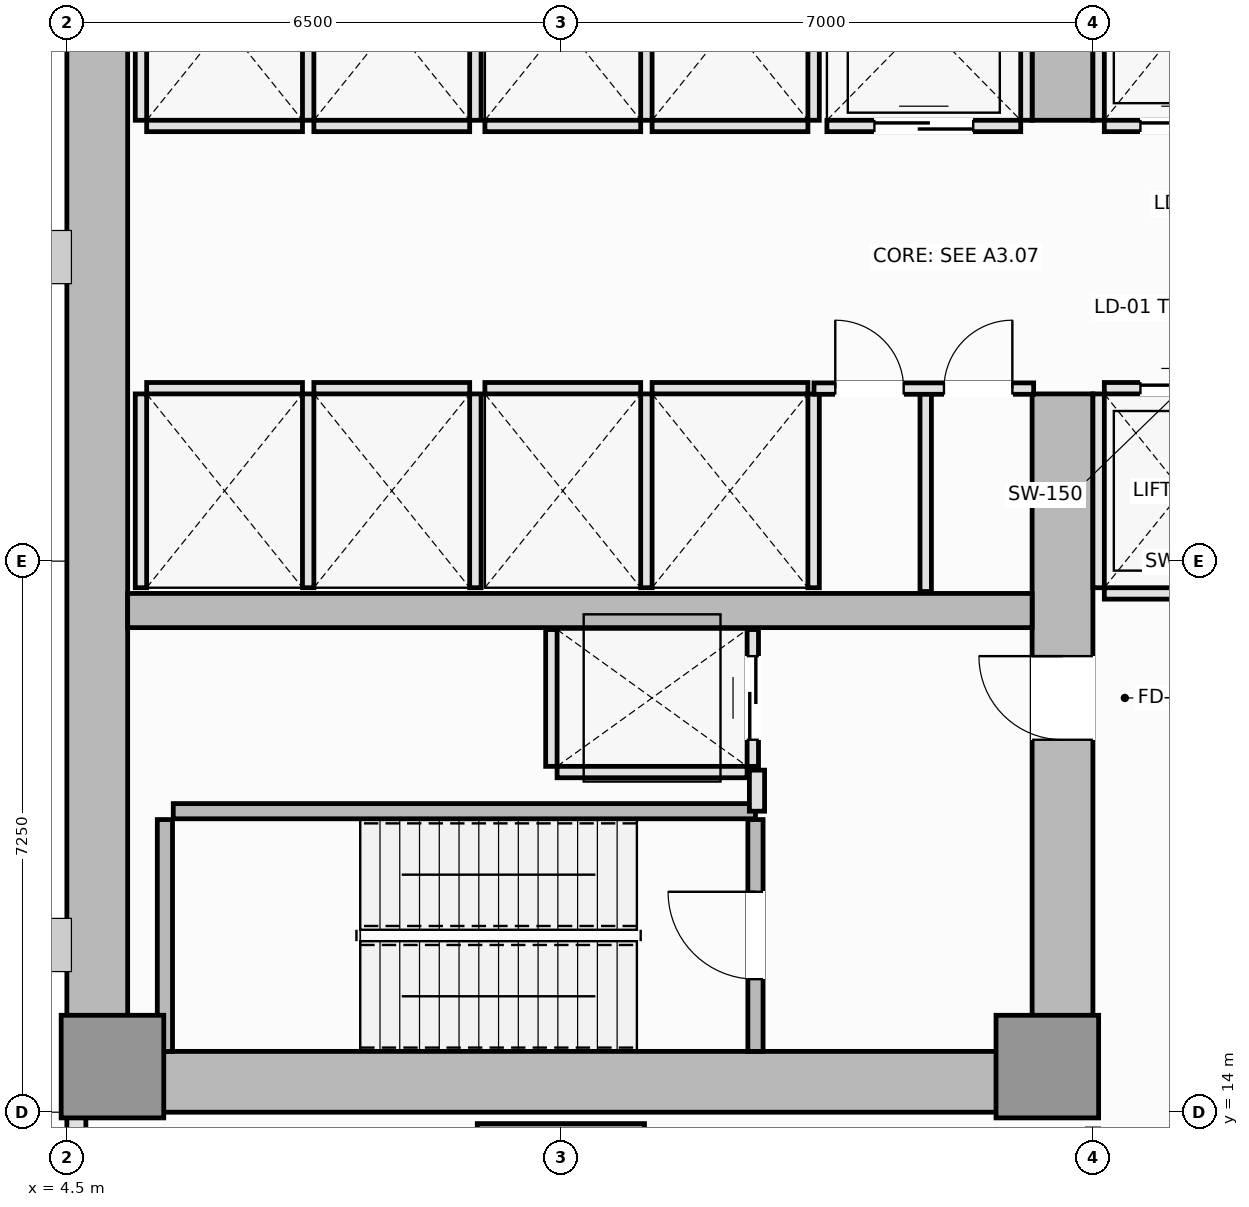
"""IFC4 building model, lengths in metres.
Left out: names, types, materials, properties, quantities, classifications, styles, units other than length and angle.
Written with IfcOpenShell. Run it as: python <this file> out.ifc"""

import sys

from ifc_helpers import new_model, si_unit, direction, frame, frame_2d, origin, origin_2d, place, context, subcontext, project, spatial, rectangle, extrude, element, fill, save


model = new_model("IFC4")
c1 = context("Model", 3, precision=1e-05, world=origin(), true_north=direction((0.0, 1.0)))
c2 = subcontext(c1, "Body", "Model", "MODEL_VIEW")
j1 = project(units=[si_unit("LENGTHUNIT", "METRE"), si_unit("PLANEANGLEUNIT", "RADIAN")], contexts=[c1])
p1 = place(None, origin())
s1 = spatial("IfcSite", under=j1, at=p1, CompositionType="ELEMENT")
p2 = place(p1, origin())
s2 = spatial("IfcBuilding", under=s1, at=p2, CompositionType="ELEMENT")
p3 = place(p2, frame((0.0, 0.0, 93.05)))
s3 = spatial("IfcBuildingStorey", under=s2, at=p3, CompositionType="ELEMENT", Elevation=93.05)
p4 = place(p3, frame((4.5, 14.4, 0.0), z_axis=(0.0, 0.0, 1.0), x_axis=(1.0, 0.0, 0.0)))
e1 = element("IfcWall", 1, at=p4, inside=s3, PredefinedType="SHEAR", context=c2, shape_type="SweptSolid", body=[
    extrude(rectangle(XDim=13.5, YDim=0.8, at=frame_2d((6.75, 0.0))), origin(), (0.0, 0.0, 1.0), 4.8),
])
p5 = place(p3, frame((4.9, 14.8, 0.0), z_axis=(0.0, 0.0, 1.0), x_axis=(0.0, 1.0, 0.0)))
e2 = element("IfcWall", 2, at=p5, inside=s3, PredefinedType="SHEAR", context=c2, shape_type="SweptSolid", body=[
    extrude(rectangle(XDim=20.9, YDim=0.8, at=frame_2d((10.45, 0.0))), origin(), (0.0, 0.0, 1.0), 4.8),
])
p6 = place(p3, frame((17.6, 14.8, 0.0), z_axis=(0.0, 0.0, 1.0), x_axis=(0.0, 1.0, 0.0)))
e3 = element("IfcWall", 3, at=p6, inside=s3, PredefinedType="SHEAR", context=c2, shape_type="SweptSolid", body=[
    extrude(rectangle(XDim=8.65, YDim=0.8, at=frame_2d((4.325, 0.0))), origin(), (0.0, 0.0, 1.0), 4.8),
])
p7 = place(p6, frame((4.1, 0.0, 0.0)))
e4 = element("IfcOpeningElement", 4, at=p7, cuts=e3, PredefinedType="OPENING", context=c2, shape_type="SweptSolid", body=[
    extrude(rectangle(XDim=1.1, YDim=2.15, at=frame_2d((0.55, 1.075))), frame((0.0, 0.41, 0.0), z_axis=(0.0, -1.0, 0.0), x_axis=(1.0, 0.0, 0.0)), (0.0, 0.0, 1.0), 0.82),
])
p8 = place(p3, frame((17.6, 27.05, 0.0), z_axis=(0.0, 0.0, 1.0), x_axis=(0.0, 1.0, 0.0)))
e5 = element("IfcWall", 5, at=p8, inside=s3, PredefinedType="SHEAR", context=c2, shape_type="SweptSolid", body=[
    extrude(rectangle(XDim=8.65, YDim=0.8, at=frame_2d((4.325, 0.0))), origin(), (0.0, 0.0, 1.0), 4.8),
])
p9 = place(p8, frame((3.45, 0.0, 0.0)))
e6 = element("IfcOpeningElement", 6, at=p9, cuts=e5, PredefinedType="OPENING", context=c2, shape_type="SweptSolid", body=[
    extrude(rectangle(XDim=1.1, YDim=2.15, at=frame_2d((0.55, 1.075))), frame((0.0, 0.41, 0.0), z_axis=(0.0, -1.0, 0.0), x_axis=(1.0, 0.0, 0.0)), (0.0, 0.0, 1.0), 0.82),
])
p10 = place(p3, frame((5.3, 20.6, 0.0), z_axis=(0.0, 0.0, 1.0), x_axis=(1.0, 0.0, 0.0)))
e7 = element("IfcWall", 7, at=p10, inside=s3, PredefinedType="SHEAR", context=c2, shape_type="SweptSolid", body=[
    extrude(rectangle(XDim=11.9, YDim=0.45, at=frame_2d((5.95, 0.0))), origin(), (0.0, 0.0, 1.0), 4.8),
])
for number, where, z_axis, x_axis in (
    (8, (5.1, 14.6, 0.0), (0.0, 0.0, 1.0), (1.0, 0.0, 0.0)),
    (9, (17.4, 14.6, 0.0), (0.0, 0.0, 1.0), (1.0, 0.0, 0.0)),
):
    element("IfcColumn", number, at=place(p3, frame(where, z_axis=z_axis, x_axis=x_axis)), inside=s3, PredefinedType="PILASTER", context=c2, shape_type="SweptSolid", body=[
        extrude(rectangle(XDim=1.35, YDim=1.35, at=origin_2d()), origin(), (0.0, 0.0, 1.0), 4.8),
    ])
p11 = place(p3, frame((11.0, 12.75, 0.0), z_axis=(0.0, 0.0, 1.0), x_axis=(1.0, 0.0, 0.0)))
e10 = element("IfcColumn", 10, at=p11, inside=s3, PredefinedType="COLUMN", context=c2, shape_type="SweptSolid", body=[
    extrude(rectangle(XDim=2.2, YDim=2.2, at=origin_2d()), origin(), (0.0, 0.0, 1.0), 4.8),
])
p12 = place(p3, frame((4.625, 14.0, 0.0), z_axis=(0.0, 0.0, 1.0), x_axis=(0.0, -1.0, 0.0)))
e11 = element("IfcWall", 11, at=p12, inside=s3, PredefinedType="SOLIDWALL", context=c2, shape_type="SweptSolid", body=[
    extrude(rectangle(XDim=8.0, YDim=0.25, at=frame_2d((4.0, 0.0))), origin(), (0.0, 0.0, 1.0), 4.62),
])
p13 = place(p3, frame((5.79, 14.8, 0.0), z_axis=(0.0, 0.0, 1.0), x_axis=(0.0, 1.0, 0.0)))
e12 = element("IfcWall", 12, at=p13, inside=s3, PredefinedType="SOLIDWALL", context=c2, shape_type="SweptSolid", body=[
    extrude(rectangle(XDim=3.05, YDim=0.2, at=frame_2d((1.525, 0.0))), origin(), (0.0, 0.0, 1.0), 4.8),
])
p14 = place(p3, frame((5.9, 17.96, 0.0), z_axis=(0.0, 0.0, 1.0), x_axis=(1.0, 0.0, 0.0)))
e13 = element("IfcWall", 13, at=p14, inside=s3, PredefinedType="SOLIDWALL", context=c2, shape_type="SweptSolid", body=[
    extrude(rectangle(XDim=7.66, YDim=0.2, at=frame_2d((3.83, 0.0))), origin(), (0.0, 0.0, 1.0), 4.8),
])
p15 = place(p3, frame((13.56, 14.8, 0.0), z_axis=(0.0, 0.0, 1.0), x_axis=(0.0, 1.0, 0.0)))
e14 = element("IfcWall", 14, at=p15, inside=s3, PredefinedType="SOLIDWALL", context=c2, shape_type="SweptSolid", body=[
    extrude(rectangle(XDim=3.05, YDim=0.2, at=frame_2d((1.525, 0.0))), origin(), (0.0, 0.0, 1.0), 4.8),
])
p16 = place(p15, frame((0.95, 0.0, 0.0)))
e15 = element("IfcOpeningElement", 15, at=p16, cuts=e14, PredefinedType="OPENING", context=c2, shape_type="SweptSolid", body=[
    extrude(rectangle(XDim=1.15, YDim=2.15, at=frame_2d((0.575, 1.075))), frame((0.0, 0.11, 0.0), z_axis=(0.0, -1.0, 0.0), x_axis=(1.0, 0.0, 0.0)), (0.0, 0.0, 1.0), 0.22),
])
p17 = place(p3, frame((18.15, 20.825, 0.0), z_axis=(0.0, 0.0, 1.0), x_axis=(1.0, 0.0, 0.0)))
e16 = element("IfcWall", 16, at=p17, inside=s3, PredefinedType="PARTITIONING", context=c2, shape_type="SweptSolid", body=[
    extrude(rectangle(XDim=2.05, YDim=0.15, at=frame_2d((1.025, 0.0))), origin(), (0.0, 0.0, 1.0), 4.62),
])
p18 = place(p3, frame((18.15, 23.525, 0.0), z_axis=(0.0, 0.0, 1.0), x_axis=(1.0, 0.0, 0.0)))
e17 = element("IfcWall", 17, at=p18, inside=s3, PredefinedType="PARTITIONING", context=c2, shape_type="SweptSolid", body=[
    extrude(rectangle(XDim=2.05, YDim=0.15, at=frame_2d((1.025, 0.0))), origin(), (0.0, 0.0, 1.0), 4.62),
])
p19 = place(p18, frame((0.475, 0.0, 0.0)))
e18 = element("IfcOpeningElement", 18, at=p19, cuts=e17, PredefinedType="OPENING", context=c2, shape_type="SweptSolid", body=[
    extrude(rectangle(XDim=1.1, YDim=2.2, at=frame_2d((0.55, 1.1))), frame((0.0, 0.085, 0.0), z_axis=(0.0, -1.0, 0.0), x_axis=(1.0, 0.0, 0.0)), (0.0, 0.0, 1.0), 0.17),
])
p20 = place(p3, frame((18.075, 20.9, 0.0), z_axis=(0.0, 0.0, 1.0), x_axis=(0.0, 1.0, 0.0)))
e19 = element("IfcWall", 19, at=p20, inside=s3, PredefinedType="PARTITIONING", context=c2, shape_type="SweptSolid", body=[
    extrude(rectangle(XDim=2.55, YDim=0.15, at=frame_2d((1.275, 0.0))), origin(), (0.0, 0.0, 1.0), 4.62),
])
p21 = place(p3, frame((18.15, 26.975, 0.0), z_axis=(0.0, 0.0, 1.0), x_axis=(1.0, 0.0, 0.0)))
e20 = element("IfcWall", 20, at=p21, inside=s3, PredefinedType="PARTITIONING", context=c2, shape_type="SweptSolid", body=[
    extrude(rectangle(XDim=2.05, YDim=0.15, at=frame_2d((1.025, 0.0))), origin(), (0.0, 0.0, 1.0), 4.62),
])
p22 = place(p21, frame((0.475, 0.0, 0.0)))
e21 = element("IfcOpeningElement", 21, at=p22, cuts=e20, PredefinedType="OPENING", context=c2, shape_type="SweptSolid", body=[
    extrude(rectangle(XDim=1.1, YDim=2.2, at=frame_2d((0.55, 1.1))), frame((0.0, 0.085, 0.0), z_axis=(0.0, -1.0, 0.0), x_axis=(1.0, 0.0, 0.0)), (0.0, 0.0, 1.0), 0.17),
])
p23 = place(p3, frame((18.075, 27.05, 0.0), z_axis=(0.0, 0.0, 1.0), x_axis=(0.0, 1.0, 0.0)))
e22 = element("IfcWall", 22, at=p23, inside=s3, PredefinedType="PARTITIONING", context=c2, shape_type="SweptSolid", body=[
    extrude(rectangle(XDim=2.55, YDim=0.15, at=frame_2d((1.275, 0.0))), origin(), (0.0, 0.0, 1.0), 4.62),
])
p24 = place(p3, frame((5.55, 23.525, 0.0), z_axis=(0.0, 0.0, 1.0), x_axis=(1.0, 0.0, 0.0)))
e23 = element("IfcWall", 23, at=p24, inside=s3, PredefinedType="PARTITIONING", context=c2, shape_type="SweptSolid", body=[
    extrude(rectangle(XDim=2.05, YDim=0.15, at=frame_2d((1.025, 0.0))), origin(), (0.0, 0.0, 1.0), 4.62),
])
for number, where, z_axis, x_axis in (
    (24, (5.475, 20.9, 0.0), (0.0, 0.0, 1.0), (0.0, 1.0, 0.0)),
    (25, (7.675, 20.9, 0.0), (0.0, 0.0, 1.0), (0.0, 1.0, 0.0)),
):
    element("IfcWall", number, at=place(p3, frame(where, z_axis=z_axis, x_axis=x_axis)), inside=s3, PredefinedType="PARTITIONING", context=c2, shape_type="SweptSolid", body=[
        extrude(rectangle(XDim=2.55, YDim=0.15, at=frame_2d((1.275, 0.0))), origin(), (0.0, 0.0, 1.0), 4.62),
    ])
p25 = place(p3, frame((7.75, 23.525, 0.0), z_axis=(0.0, 0.0, 1.0), x_axis=(1.0, 0.0, 0.0)))
e26 = element("IfcWall", 26, at=p25, inside=s3, PredefinedType="PARTITIONING", context=c2, shape_type="SweptSolid", body=[
    extrude(rectangle(XDim=2.05, YDim=0.15, at=frame_2d((1.025, 0.0))), origin(), (0.0, 0.0, 1.0), 4.62),
])
p26 = place(p3, frame((9.875, 20.9, 0.0), z_axis=(0.0, 0.0, 1.0), x_axis=(0.0, 1.0, 0.0)))
e27 = element("IfcWall", 27, at=p26, inside=s3, PredefinedType="PARTITIONING", context=c2, shape_type="SweptSolid", body=[
    extrude(rectangle(XDim=2.55, YDim=0.15, at=frame_2d((1.275, 0.0))), origin(), (0.0, 0.0, 1.0), 4.62),
])
p27 = place(p3, frame((5.55, 26.975, 0.0), z_axis=(0.0, 0.0, 1.0), x_axis=(1.0, 0.0, 0.0)))
e28 = element("IfcWall", 28, at=p27, inside=s3, PredefinedType="PARTITIONING", context=c2, shape_type="SweptSolid", body=[
    extrude(rectangle(XDim=2.05, YDim=0.15, at=frame_2d((1.025, 0.0))), origin(), (0.0, 0.0, 1.0), 4.62),
])
for number, where, z_axis, x_axis in (
    (29, (5.475, 27.05, 0.0), (0.0, 0.0, 1.0), (0.0, 1.0, 0.0)),
    (30, (7.675, 27.05, 0.0), (0.0, 0.0, 1.0), (0.0, 1.0, 0.0)),
):
    element("IfcWall", number, at=place(p3, frame(where, z_axis=z_axis, x_axis=x_axis)), inside=s3, PredefinedType="PARTITIONING", context=c2, shape_type="SweptSolid", body=[
        extrude(rectangle(XDim=2.55, YDim=0.15, at=frame_2d((1.275, 0.0))), origin(), (0.0, 0.0, 1.0), 4.62),
    ])
p28 = place(p3, frame((7.75, 26.975, 0.0), z_axis=(0.0, 0.0, 1.0), x_axis=(1.0, 0.0, 0.0)))
e31 = element("IfcWall", 31, at=p28, inside=s3, PredefinedType="PARTITIONING", context=c2, shape_type="SweptSolid", body=[
    extrude(rectangle(XDim=2.05, YDim=0.15, at=frame_2d((1.025, 0.0))), origin(), (0.0, 0.0, 1.0), 4.62),
])
p29 = place(p3, frame((9.875, 27.05, 0.0), z_axis=(0.0, 0.0, 1.0), x_axis=(0.0, 1.0, 0.0)))
e32 = element("IfcWall", 32, at=p29, inside=s3, PredefinedType="PARTITIONING", context=c2, shape_type="SweptSolid", body=[
    extrude(rectangle(XDim=2.55, YDim=0.15, at=frame_2d((1.275, 0.0))), origin(), (0.0, 0.0, 1.0), 4.62),
])
p30 = place(p3, frame((10.0, 23.525, 0.0), z_axis=(0.0, 0.0, 1.0), x_axis=(1.0, 0.0, 0.0)))
e33 = element("IfcWall", 33, at=p30, inside=s3, PredefinedType="PARTITIONING", context=c2, shape_type="SweptSolid", body=[
    extrude(rectangle(XDim=2.05, YDim=0.15, at=frame_2d((1.025, 0.0))), origin(), (0.0, 0.0, 1.0), 4.62),
])
p31 = place(p3, frame((12.125, 20.9, 0.0), z_axis=(0.0, 0.0, 1.0), x_axis=(0.0, 1.0, 0.0)))
e34 = element("IfcWall", 34, at=p31, inside=s3, PredefinedType="PARTITIONING", context=c2, shape_type="SweptSolid", body=[
    extrude(rectangle(XDim=2.55, YDim=0.15, at=frame_2d((1.275, 0.0))), origin(), (0.0, 0.0, 1.0), 4.62),
])
p32 = place(p3, frame((12.2, 23.525, 0.0), z_axis=(0.0, 0.0, 1.0), x_axis=(1.0, 0.0, 0.0)))
e35 = element("IfcWall", 35, at=p32, inside=s3, PredefinedType="PARTITIONING", context=c2, shape_type="SweptSolid", body=[
    extrude(rectangle(XDim=2.05, YDim=0.15, at=frame_2d((1.025, 0.0))), origin(), (0.0, 0.0, 1.0), 4.62),
])
p33 = place(p3, frame((14.325, 20.9, 0.0), z_axis=(0.0, 0.0, 1.0), x_axis=(0.0, 1.0, 0.0)))
e36 = element("IfcWall", 36, at=p33, inside=s3, PredefinedType="PARTITIONING", context=c2, shape_type="SweptSolid", body=[
    extrude(rectangle(XDim=2.55, YDim=0.15, at=frame_2d((1.275, 0.0))), origin(), (0.0, 0.0, 1.0), 4.62),
])
p34 = place(p3, frame((10.0, 26.975, 0.0), z_axis=(0.0, 0.0, 1.0), x_axis=(1.0, 0.0, 0.0)))
e37 = element("IfcWall", 37, at=p34, inside=s3, PredefinedType="PARTITIONING", context=c2, shape_type="SweptSolid", body=[
    extrude(rectangle(XDim=2.05, YDim=0.15, at=frame_2d((1.025, 0.0))), origin(), (0.0, 0.0, 1.0), 4.62),
])
p35 = place(p3, frame((12.125, 27.05, 0.0), z_axis=(0.0, 0.0, 1.0), x_axis=(0.0, 1.0, 0.0)))
e38 = element("IfcWall", 38, at=p35, inside=s3, PredefinedType="PARTITIONING", context=c2, shape_type="SweptSolid", body=[
    extrude(rectangle(XDim=2.55, YDim=0.15, at=frame_2d((1.275, 0.0))), origin(), (0.0, 0.0, 1.0), 4.62),
])
p36 = place(p3, frame((12.2, 26.975, 0.0), z_axis=(0.0, 0.0, 1.0), x_axis=(1.0, 0.0, 0.0)))
e39 = element("IfcWall", 39, at=p36, inside=s3, PredefinedType="PARTITIONING", context=c2, shape_type="SweptSolid", body=[
    extrude(rectangle(XDim=2.05, YDim=0.15, at=frame_2d((1.025, 0.0))), origin(), (0.0, 0.0, 1.0), 4.62),
])
p37 = place(p3, frame((14.325, 27.05, 0.0), z_axis=(0.0, 0.0, 1.0), x_axis=(0.0, 1.0, 0.0)))
e40 = element("IfcWall", 40, at=p37, inside=s3, PredefinedType="PARTITIONING", context=c2, shape_type="SweptSolid", body=[
    extrude(rectangle(XDim=2.55, YDim=0.15, at=frame_2d((1.275, 0.0))), origin(), (0.0, 0.0, 1.0), 4.62),
])
p38 = place(p3, frame((14.5, 26.975, 0.0), z_axis=(0.0, 0.0, 1.0), x_axis=(1.0, 0.0, 0.0)))
e41 = element("IfcWall", 41, at=p38, inside=s3, PredefinedType="PARTITIONING", context=c2, shape_type="SweptSolid", body=[
    extrude(rectangle(XDim=2.55, YDim=0.15, at=frame_2d((1.275, 0.0))), origin(), (0.0, 0.0, 1.0), 4.62),
])
p39 = place(p38, frame((0.625, 0.0, 0.0)))
e42 = element("IfcOpeningElement", 42, at=p39, cuts=e41, PredefinedType="OPENING", context=c2, shape_type="SweptSolid", body=[
    extrude(rectangle(XDim=1.3, YDim=2.2, at=frame_2d((0.65, 1.1))), frame((0.0, 0.085, 0.0), z_axis=(0.0, -1.0, 0.0), x_axis=(1.0, 0.0, 0.0)), (0.0, 0.0, 1.0), 0.17),
])
p40 = place(p3, frame((17.125, 27.05, 0.0), z_axis=(0.0, 0.0, 1.0), x_axis=(0.0, 1.0, 0.0)))
e43 = element("IfcWall", 43, at=p40, inside=s3, PredefinedType="PARTITIONING", context=c2, shape_type="SweptSolid", body=[
    extrude(rectangle(XDim=2.6, YDim=0.15, at=frame_2d((1.3, 0.0))), origin(), (0.0, 0.0, 1.0), 4.62),
])
p41 = place(p3, frame((10.95, 18.475, 0.0), z_axis=(0.0, 0.0, 1.0), x_axis=(1.0, 0.0, 0.0)))
e44 = element("IfcWall", 44, at=p41, inside=s3, PredefinedType="PARTITIONING", context=c2, shape_type="SweptSolid", body=[
    extrude(rectangle(XDim=2.5, YDim=0.15, at=frame_2d((1.25, 0.0))), origin(), (0.0, 0.0, 1.0), 4.62),
])
p42 = place(p3, frame((10.875, 18.55, 0.0), z_axis=(0.0, 0.0, 1.0), x_axis=(0.0, 1.0, 0.0)))
e45 = element("IfcWall", 45, at=p42, inside=s3, PredefinedType="PARTITIONING", context=c2, shape_type="SweptSolid", body=[
    extrude(rectangle(XDim=1.8, YDim=0.15, at=frame_2d((0.9, 0.0))), origin(), (0.0, 0.0, 1.0), 4.62),
])
p43 = place(p3, frame((13.525, 18.55, 0.0), z_axis=(0.0, 0.0, 1.0), x_axis=(0.0, 1.0, 0.0)))
e46 = element("IfcWall", 46, at=p43, inside=s3, PredefinedType="PARTITIONING", context=c2, shape_type="SweptSolid", body=[
    extrude(rectangle(XDim=1.8, YDim=0.15, at=frame_2d((0.9, 0.0))), origin(), (0.0, 0.0, 1.0), 4.62),
])
p44 = place(p43, frame((0.35, 0.0, 0.0)))
e47 = element("IfcOpeningElement", 47, at=p44, cuts=e46, PredefinedType="OPENING", context=c2, shape_type="SweptSolid", body=[
    extrude(rectangle(XDim=1.1, YDim=2.2, at=frame_2d((0.55, 1.1))), frame((0.0, 0.085, 0.0), z_axis=(0.0, -1.0, 0.0), x_axis=(1.0, 0.0, 0.0)), (0.0, 0.0, 1.0), 0.17),
])
p45 = place(p3, frame((13.58, 17.96, 0.0), z_axis=(0.0, 0.0, 1.0), x_axis=(0.0, 1.0, 0.0)))
e48 = element("IfcWall", 48, at=p45, inside=s3, PredefinedType="PARTITIONING", context=c2, shape_type="SweptSolid", body=[
    extrude(rectangle(XDim=0.54, YDim=0.2, at=frame_2d((0.27, 0.0))), origin(), (0.0, 0.0, 1.0), 4.62),
])
p46 = place(p3, frame((15.8, 20.85, 0.0), z_axis=(0.0, 0.0, 1.0), x_axis=(0.0, 1.0, 0.0)))
e49 = element("IfcWall", 49, at=p46, inside=s3, PredefinedType="PARTITIONING", context=c2, shape_type="SweptSolid", body=[
    extrude(rectangle(XDim=2.67, YDim=0.15, at=frame_2d((1.335, 0.0))), origin(), (0.0, 0.0, 1.0), 4.62),
])
p47 = place(p3, frame((14.33, 23.52, 0.0), z_axis=(0.0, 0.0, 1.0), x_axis=(1.0, 0.0, 0.0)))
e50 = element("IfcWall", 50, at=p47, inside=s3, PredefinedType="PARTITIONING", context=c2, shape_type="SweptSolid", body=[
    extrude(rectangle(XDim=2.89, YDim=0.15, at=frame_2d((1.445, 0.0))), origin(), (0.0, 0.0, 1.0), 4.62),
])
p48 = place(p47, frame((0.28, 0.0, 0.0)))
e51 = element("IfcOpeningElement", 51, at=p48, cuts=e50, PredefinedType="OPENING", context=c2, shape_type="SweptSolid", body=[
    extrude(rectangle(XDim=0.9, YDim=2.1, at=frame_2d((0.45, 1.05))), frame((0.0, 0.085, 0.0), z_axis=(0.0, -1.0, 0.0), x_axis=(1.0, 0.0, 0.0)), (0.0, 0.0, 1.0), 0.17),
])
p49 = place(p47, frame((1.71, 0.0, 0.0)))
e52 = element("IfcOpeningElement", 52, at=p49, cuts=e50, PredefinedType="OPENING", context=c2, shape_type="SweptSolid", body=[
    extrude(rectangle(XDim=0.9, YDim=2.1, at=frame_2d((0.45, 1.05))), frame((0.0, 0.085, 0.0), z_axis=(0.0, -1.0, 0.0), x_axis=(1.0, 0.0, 0.0)), (0.0, 0.0, 1.0), 0.17),
])
p50 = place(p16, origin())
e53 = element("IfcDoor", 53, at=p50, inside=s3, OperationType="SINGLE_SWING_RIGHT", PredefinedType="DOOR", context=c2, shape_type="SweptSolid", body=[
    extrude(rectangle(XDim=1.15, YDim=2.15, at=frame_2d((0.575, 1.075))), frame((0.0, 0.025, 0.0), z_axis=(0.0, -1.0, 0.0), x_axis=(1.0, 0.0, 0.0)), (0.0, 0.0, 1.0), 0.05),
])
fill(e15, e53)
p51 = place(p19, origin())
e54 = element("IfcDoor", 54, at=p51, inside=s3, OperationType="DOUBLE_DOOR_SLIDING", PredefinedType="DOOR", context=c2, shape_type="SweptSolid", body=[
    extrude(rectangle(XDim=1.1, YDim=2.2, at=frame_2d((0.55, 1.1))), frame((0.0, 0.025, 0.0), z_axis=(0.0, -1.0, 0.0), x_axis=(1.0, 0.0, 0.0)), (0.0, 0.0, 1.0), 0.05),
])
fill(e18, e54)
p52 = place(p22, origin())
e55 = element("IfcDoor", 55, at=p52, inside=s3, OperationType="DOUBLE_DOOR_SLIDING", PredefinedType="DOOR", context=c2, shape_type="SweptSolid", body=[
    extrude(rectangle(XDim=1.1, YDim=2.2, at=frame_2d((0.55, 1.1))), frame((0.0, 0.025, 0.0), z_axis=(0.0, -1.0, 0.0), x_axis=(1.0, 0.0, 0.0)), (0.0, 0.0, 1.0), 0.05),
])
fill(e21, e55)
p53 = place(p39, origin())
e56 = element("IfcDoor", 56, at=p53, inside=s3, OperationType="DOUBLE_DOOR_SLIDING", PredefinedType="DOOR", context=c2, shape_type="SweptSolid", body=[
    extrude(rectangle(XDim=1.3, YDim=2.2, at=frame_2d((0.65, 1.1))), frame((0.0, 0.025, 0.0), z_axis=(0.0, -1.0, 0.0), x_axis=(1.0, 0.0, 0.0)), (0.0, 0.0, 1.0), 0.05),
])
fill(e42, e56)
p54 = place(p44, origin())
e57 = element("IfcDoor", 57, at=p54, inside=s3, OperationType="DOUBLE_DOOR_SLIDING", PredefinedType="DOOR", context=c2, shape_type="SweptSolid", body=[
    extrude(rectangle(XDim=1.1, YDim=2.2, at=frame_2d((0.55, 1.1))), frame((0.0, 0.025, 0.0), z_axis=(0.0, -1.0, 0.0), x_axis=(1.0, 0.0, 0.0)), (0.0, 0.0, 1.0), 0.05),
])
fill(e47, e57)
p55 = place(p7, origin())
e58 = element("IfcDoor", 58, at=p55, inside=s3, OperationType="SINGLE_SWING_RIGHT", PredefinedType="DOOR", context=c2, shape_type="SweptSolid", body=[
    extrude(rectangle(XDim=1.1, YDim=2.15, at=frame_2d((0.55, 1.075))), frame((0.0, 0.025, 0.0), z_axis=(0.0, -1.0, 0.0), x_axis=(1.0, 0.0, 0.0)), (0.0, 0.0, 1.0), 0.05),
])
fill(e4, e58)
p56 = place(p48, origin())
e59 = element("IfcDoor", 59, at=p56, inside=s3, OperationType="SINGLE_SWING_LEFT", PredefinedType="DOOR", context=c2, shape_type="SweptSolid", body=[
    extrude(rectangle(XDim=0.9, YDim=2.1, at=frame_2d((0.45, 1.05))), frame((0.0, 0.025, 0.0), z_axis=(0.0, -1.0, 0.0), x_axis=(1.0, 0.0, 0.0)), (0.0, 0.0, 1.0), 0.05),
])
fill(e51, e59)
p57 = place(p49, origin())
e60 = element("IfcDoor", 60, at=p57, inside=s3, OperationType="SINGLE_SWING_RIGHT", PredefinedType="DOOR", context=c2, shape_type="SweptSolid", body=[
    extrude(rectangle(XDim=0.9, YDim=2.1, at=frame_2d((0.45, 1.05))), frame((0.0, 0.025, 0.0), z_axis=(0.0, -1.0, 0.0), x_axis=(1.0, 0.0, 0.0)), (0.0, 0.0, 1.0), 0.05),
])
fill(e52, e60)
save(model, sys.argv[1])
